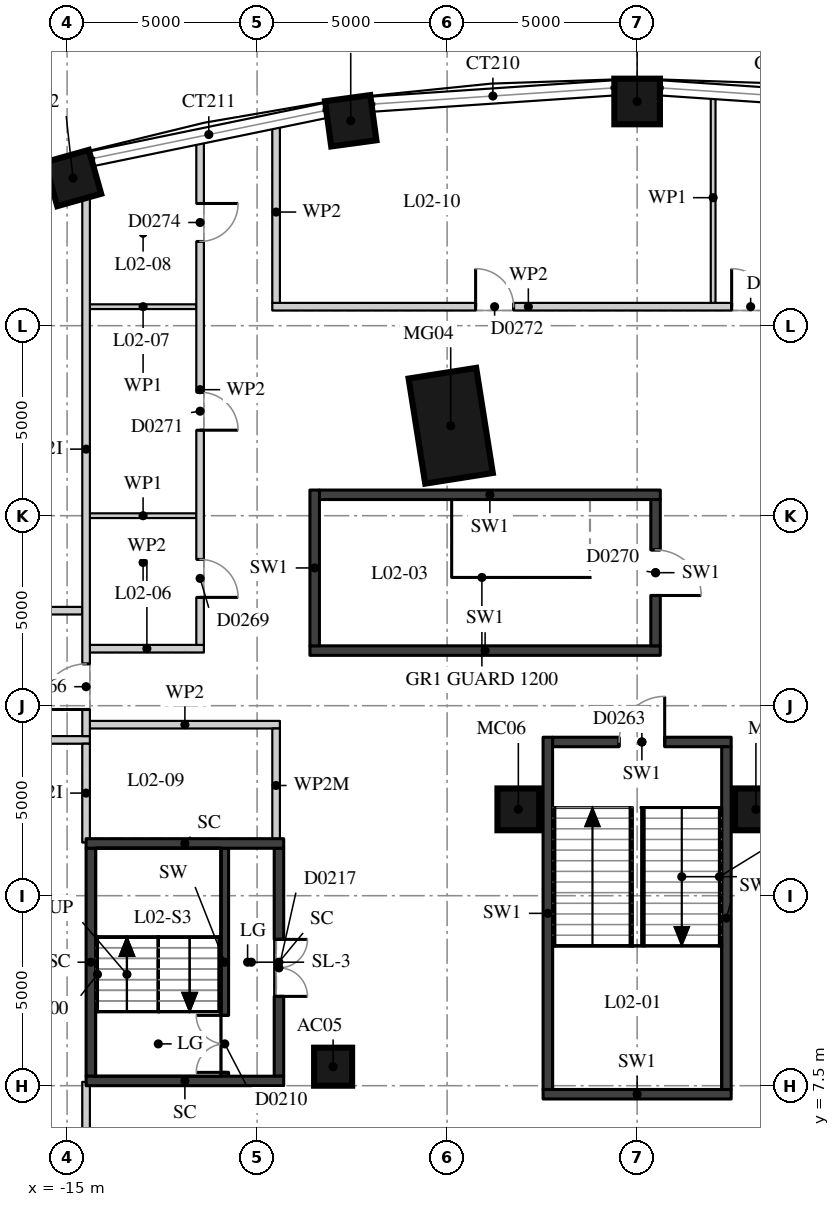
"""IFC4 building model, lengths in metres.
Left out: names, types, materials, properties, quantities, classifications, styles, units other than length and angle.
Written with IfcOpenShell. Run it as: python <this file> out.ifc"""

import sys

from ifc_helpers import new_model, si_unit, direction, frame, frame_2d, origin, origin_2d, place, context, subcontext, project, spatial, rectangle, extrude, element, fill, save


model = new_model("IFC4")
c1 = context("Model", 3, precision=1e-05, world=origin(), true_north=direction((0.0, 1.0)))
c2 = subcontext(c1, "Body", "Model", "MODEL_VIEW")
j1 = project(units=[si_unit("LENGTHUNIT", "METRE"), si_unit("PLANEANGLEUNIT", "RADIAN")], contexts=[c1])
p1 = place(None, origin())
s1 = spatial("IfcSite", under=j1, at=p1, CompositionType="ELEMENT")
p2 = place(p1, origin())
s2 = spatial("IfcBuilding", under=s1, at=p2, CompositionType="ELEMENT")
p3 = place(p2, frame((0.0, 0.0, 12.5)))
s3 = spatial("IfcBuildingStorey", under=s2, at=p3, CompositionType="ELEMENT", Elevation=12.5)
p4 = place(p3, frame((-4.906, 24.866, 0.0), z_axis=(0.0, 0.0, 1.0), x_axis=(-0.15614709407, 0.987733812833, 0.0)))
e1 = element("IfcColumn", 1, at=p4, inside=s3, PredefinedType="COLUMN", context=c2, shape_type="SweptSolid", body=[
    extrude(rectangle(XDim=2.8, YDim=1.8, at=origin_2d()), origin(), (0.0, 0.0, 1.0), 5.0),
])
p5 = place(p3, frame((-8.0, 8.0, 0.0), z_axis=(0.0, 0.0, 1.0), x_axis=(1.0, 0.0, 0.0)))
e2 = element("IfcColumn", 2, at=p5, inside=s3, PredefinedType="COLUMN", context=c2, shape_type="SweptSolid", body=[
    extrude(rectangle(XDim=1.0, YDim=1.0, at=origin_2d()), origin(), (0.0, 0.0, 1.0), 5.0),
])
for number, where, z_axis, x_axis in (
    (3, (3.126, 14.772, 0.0), (0.0, 0.0, 1.0), (1.0, 0.0, 0.0)),
    (4, (-3.126, 14.772, 0.0), (0.0, 0.0, 1.0), (1.0, 0.0, 0.0)),
):
    element("IfcColumn", number, at=place(p3, frame(where, z_axis=z_axis, x_axis=x_axis)), inside=s3, PredefinedType="COLUMN", context=c2, shape_type="SweptSolid", body=[
        extrude(rectangle(XDim=1.1, YDim=1.1, at=origin_2d()), origin(), (0.0, 0.0, 1.0), 5.0),
    ])
for number, where, z_axis, x_axis in (
    (5, (0.0, 33.4, 0.0), (0.0, 0.0, 1.0), (0.0, 1.0, 0.0)),
    (6, (-7.536, 32.893, 0.0), (0.0, 0.0, 1.0), (-0.135, 0.991, 0.0)),
    (7, (-14.844, 31.386, 0.0), (0.0, 0.0, 1.0), (-0.271, 0.963, 0.0)),
):
    element("IfcColumn", number, at=place(p3, frame(where, z_axis=z_axis, x_axis=x_axis)), inside=s3, PredefinedType="COLUMN", context=c2, shape_type="SweptSolid", body=[
        extrude(rectangle(XDim=1.2, YDim=1.2, at=origin_2d()), origin(), (0.0, 0.0, 1.0), 5.0),
    ])
p6 = place(p3, frame((-10.85, 7.75, 0.0), z_axis=(0.0, 0.0, 1.0), x_axis=(0.0, 1.0, 0.0)))
e8 = element("IfcWall", 8, at=p6, inside=s3, PredefinedType="SHEAR", context=c2, shape_type="SweptSolid", body=[
    extrude(rectangle(XDim=6.0, YDim=0.2, at=frame_2d((3.0, 0.0))), origin(), (0.0, 0.0, 1.0), 4.65),
])
p7 = place(p6, frame((0.1, 0.0, 0.0)))
e9 = element("IfcOpeningElement", 9, at=p7, cuts=e8, PredefinedType="OPENING", context=c2, shape_type="SweptSolid", body=[
    extrude(rectangle(XDim=1.5, YDim=2.1, at=frame_2d((0.75, 1.05))), frame((0.0, 0.11, 0.0), z_axis=(0.0, -1.0, 0.0), x_axis=(1.0, 0.0, 0.0)), (0.0, 0.0, 1.0), 0.22),
])
p8 = place(p3, frame((-14.375, 7.75, -0.41), z_axis=(0.0, 0.0, 1.0), x_axis=(0.0, 1.0, 0.0)))
e10 = element("IfcWall", 10, at=p8, inside=s3, PredefinedType="SHEAR", context=c2, shape_type="SweptSolid", body=[
    extrude(rectangle(XDim=6.0, YDim=0.25, at=frame_2d((3.0, 0.0))), origin(), (0.0, 0.0, 1.0), 5.06),
])
p9 = place(p3, frame((-9.425, 7.75, -0.41), z_axis=(0.0, 0.0, 1.0), x_axis=(0.0, 1.0, 0.0)))
e11 = element("IfcWall", 11, at=p9, inside=s3, PredefinedType="SHEAR", context=c2, shape_type="SweptSolid", body=[
    extrude(rectangle(XDim=6.0, YDim=0.25, at=frame_2d((3.0, 0.0))), origin(), (0.0, 0.0, 1.0), 5.06),
])
p10 = place(p9, frame((2.1, 0.0, 0.41)))
e12 = element("IfcOpeningElement", 12, at=p10, cuts=e11, PredefinedType="OPENING", context=c2, shape_type="SweptSolid", body=[
    extrude(rectangle(XDim=1.5, YDim=2.1, at=frame_2d((0.75, 1.05))), frame((0.0, 0.135, 0.0), z_axis=(0.0, -1.0, 0.0), x_axis=(1.0, 0.0, 0.0)), (0.0, 0.0, 1.0), 0.27),
])
for number, where, z_axis, x_axis in (
    (13, (-14.5, 13.875, -0.41), (0.0, 0.0, 1.0), (1.0, 0.0, 0.0)),
    (14, (-14.5, 7.625, -0.41), (0.0, 0.0, 1.0), (1.0, 0.0, 0.0)),
):
    element("IfcWall", number, at=place(p3, frame(where, z_axis=z_axis, x_axis=x_axis)), inside=s3, PredefinedType="SHEAR", context=c2, shape_type="SweptSolid", body=[
        extrude(rectangle(XDim=5.2, YDim=0.25, at=frame_2d((2.6, 0.0))), origin(), (0.0, 0.0, 1.0), 5.06),
    ])
p11 = place(p3, frame((-2.475, 7.275, 0.0), z_axis=(0.0, 0.0, 1.0), x_axis=(1.0, 0.0, 0.0)))
e15 = element("IfcWall", 15, at=p11, inside=s3, PredefinedType="SOLIDWALL", context=c2, shape_type="SweptSolid", body=[
    extrude(rectangle(XDim=4.95, YDim=0.25, at=frame_2d((2.475, 0.0))), origin(), (0.0, 0.0, 1.0), 4.65),
])
p12 = place(p3, frame((-2.225, 16.545, 0.0), z_axis=(0.0, 0.0, 1.0), x_axis=(1.0, 0.0, 0.0)))
e16 = element("IfcWall", 16, at=p12, inside=s3, PredefinedType="SOLIDWALL", context=c2, shape_type="SweptSolid", body=[
    extrude(rectangle(XDim=4.7, YDim=0.25, at=frame_2d((2.35, 0.0))), origin(), (0.0, 0.0, 1.0), 4.65),
])
p13 = place(p12, frame((1.75, 0.0, 0.0)))
e17 = element("IfcOpeningElement", 17, at=p13, cuts=e16, PredefinedType="OPENING", context=c2, shape_type="SweptSolid", body=[
    extrude(rectangle(XDim=1.2, YDim=2.1, at=frame_2d((0.6, 1.05))), frame((0.0, 0.135, 0.0), z_axis=(0.0, -1.0, 0.0), x_axis=(1.0, 0.0, 0.0)), (0.0, 0.0, 1.0), 0.27),
])
p14 = place(p3, frame((-38.084, 16.6, 0.0), z_axis=(0.0, 0.0, 1.0), x_axis=(1.0, 0.0, 0.0)))
e18 = element("IfcWall", 18, at=p14, inside=s3, PredefinedType="PARTITIONING", context=c2, shape_type="SweptSolid", body=[
    extrude(rectangle(XDim=23.685, YDim=0.2, at=frame_2d((11.842, 0.0))), origin(), (0.0, 0.0, 1.0), 4.65),
])
p15 = place(p14, frame((4.492, 0.0, 0.0)))
e19 = element("IfcOpeningElement", 19, at=p15, cuts=e18, PredefinedType="OPENING", context=c2, shape_type="SweptSolid", body=[
    extrude(rectangle(XDim=1.0, YDim=2.1, at=frame_2d((0.5, 1.05))), frame((0.0, 0.11, 0.0), z_axis=(0.0, -1.0, 0.0), x_axis=(1.0, 0.0, 0.0)), (0.0, 0.0, 1.0), 0.22),
])
p16 = place(p14, frame((15.584, 0.0, 0.0)))
e20 = element("IfcOpeningElement", 20, at=p16, cuts=e18, PredefinedType="OPENING", context=c2, shape_type="SweptSolid", body=[
    extrude(rectangle(XDim=1.0, YDim=2.1, at=frame_2d((0.5, 1.05))), frame((0.0, 0.11, 0.0), z_axis=(0.0, -1.0, 0.0), x_axis=(1.0, 0.0, 0.0)), (0.0, 0.0, 1.0), 0.22),
])
p17 = place(p3, frame((-14.4, 17.0, 0.0), z_axis=(0.0, 0.0, 1.0), x_axis=(1.0, 0.0, 0.0)))
e21 = element("IfcWall", 21, at=p17, inside=s3, PredefinedType="PARTITIONING", context=c2, shape_type="SweptSolid", body=[
    extrude(rectangle(XDim=5.0, YDim=0.2, at=frame_2d((2.5, 0.0))), origin(), (0.0, 0.0, 1.0), 4.65),
])
p18 = place(p3, frame((-8.61, 18.95, 0.0), z_axis=(0.0, 0.0, 1.0), x_axis=(1.0, 0.0, 0.0)))
e22 = element("IfcWall", 22, at=p18, inside=s3, PredefinedType="SOLIDWALL", context=c2, shape_type="SweptSolid", body=[
    extrude(rectangle(XDim=9.22, YDim=0.25, at=frame_2d((4.61, 0.0))), origin(), (0.0, 0.0, 1.0), 4.65),
])
p19 = place(p3, frame((-14.4, 19.0, 0.0), z_axis=(0.0, 0.0, 1.0), x_axis=(1.0, 0.0, 0.0)))
e23 = element("IfcWall", 23, at=p19, inside=s3, PredefinedType="PARTITIONING", context=c2, shape_type="SweptSolid", body=[
    extrude(rectangle(XDim=3.0, YDim=0.2, at=frame_2d((1.5, 0.0))), origin(), (0.0, 0.0, 1.0), 4.65),
])
p20 = place(p3, frame((-17.605, 20.0, 0.0), z_axis=(0.0, 0.0, 1.0), x_axis=(1.0, 0.0, 0.0)))
e24 = element("IfcWall", 24, at=p20, inside=s3, PredefinedType="PARTITIONING", context=c2, shape_type="SweptSolid", body=[
    extrude(rectangle(XDim=3.005, YDim=0.2, at=frame_2d((1.502, 0.0))), origin(), (0.0, 0.0, 1.0), 4.65),
])
p21 = place(p3, frame((-14.4, 22.5, 0.0), z_axis=(0.0, 0.0, 1.0), x_axis=(1.0, 0.0, 0.0)))
e25 = element("IfcWall", 25, at=p21, inside=s3, PredefinedType="PARTITIONING", context=c2, shape_type="SweptSolid", body=[
    extrude(rectangle(XDim=2.8, YDim=0.125, at=frame_2d((1.4, 0.0))), origin(), (0.0, 0.0, 1.0), 4.65),
])
p22 = place(p3, frame((-8.36, 23.05, 0.0), z_axis=(0.0, 0.0, 1.0), x_axis=(1.0, 0.0, 0.0)))
e26 = element("IfcWall", 26, at=p22, inside=s3, PredefinedType="SOLIDWALL", context=c2, shape_type="SweptSolid", body=[
    extrude(rectangle(XDim=8.97, YDim=0.25, at=frame_2d((4.485, 0.0))), origin(), (0.0, 0.0, 1.0), 4.65),
])
p23 = place(p3, frame((-14.4, 28.0, 0.0), z_axis=(0.0, 0.0, 1.0), x_axis=(1.0, 0.0, 0.0)))
e27 = element("IfcWall", 27, at=p23, inside=s3, PredefinedType="PARTITIONING", context=c2, shape_type="SweptSolid", body=[
    extrude(rectangle(XDim=2.8, YDim=0.125, at=frame_2d((1.4, 0.0))), origin(), (0.0, 0.0, 1.0), 4.65),
])
p24 = place(p3, frame((-9.6, 28.0, 0.0), z_axis=(0.0, 0.0, 1.0), x_axis=(1.0, 0.0, 0.0)))
e28 = element("IfcWall", 28, at=p24, inside=s3, PredefinedType="PARTITIONING", context=c2, shape_type="SweptSolid", body=[
    extrude(rectangle(XDim=13.475, YDim=0.2, at=frame_2d((6.738, 0.0))), origin(), (0.0, 0.0, 1.0), 4.65),
])
p25 = place(p24, frame((5.35, 0.0, 0.0)))
e29 = element("IfcOpeningElement", 29, at=p25, cuts=e28, PredefinedType="OPENING", context=c2, shape_type="SweptSolid", body=[
    extrude(rectangle(XDim=1.0, YDim=2.1, at=frame_2d((0.5, 1.05))), frame((0.0, 0.11, 0.0), z_axis=(0.0, -1.0, 0.0), x_axis=(1.0, 0.0, 0.0)), (0.0, 0.0, 1.0), 0.22),
])
p26 = place(p24, frame((12.087, 0.0, 0.0)))
e30 = element("IfcOpeningElement", 30, at=p26, cuts=e28, PredefinedType="OPENING", context=c2, shape_type="SweptSolid", body=[
    extrude(rectangle(XDim=1.0, YDim=2.1, at=frame_2d((0.5, 1.05))), frame((0.0, 0.11, 0.0), z_axis=(0.0, -1.0, 0.0), x_axis=(1.0, 0.0, 0.0)), (0.0, 0.0, 1.0), 0.22),
])
p27 = place(p3, frame((-14.5, -7.6, 0.0), z_axis=(0.0, 0.0, 1.0), x_axis=(0.0, 1.0, 0.0)))
e31 = element("IfcWall", 31, at=p27, inside=s3, PredefinedType="PARTITIONING", context=c2, shape_type="SweptSolid", body=[
    extrude(rectangle(XDim=15.2, YDim=0.2, at=frame_2d((7.6, 0.0))), origin(), (0.0, 0.0, 1.0), 4.65),
])
p28 = place(p27, frame((2.087, 0.0, 0.0)))
e32 = element("IfcOpeningElement", 32, at=p28, cuts=e31, PredefinedType="OPENING", context=c2, shape_type="SweptSolid", body=[
    extrude(rectangle(XDim=1.8, YDim=2.4, at=frame_2d((0.9, 1.2))), frame((0.0, 0.11, 0.0), z_axis=(0.0, -1.0, 0.0), x_axis=(1.0, 0.0, 0.0)), (0.0, 0.0, 1.0), 0.22),
])
p29 = place(p27, frame((11.312, 0.0, 0.0)))
e33 = element("IfcOpeningElement", 33, at=p29, cuts=e31, PredefinedType="OPENING", context=c2, shape_type="SweptSolid", body=[
    extrude(rectangle(XDim=1.8, YDim=2.4, at=frame_2d((0.9, 1.2))), frame((0.0, 0.11, 0.0), z_axis=(0.0, -1.0, 0.0), x_axis=(1.0, 0.0, 0.0)), (0.0, 0.0, 1.0), 0.22),
])
p30 = place(p3, frame((-14.5, 13.9, 0.0), z_axis=(0.0, 0.0, 1.0), x_axis=(0.0, 1.0, 0.0)))
e34 = element("IfcWall", 34, at=p30, inside=s3, PredefinedType="PARTITIONING", context=c2, shape_type="SweptSolid", body=[
    extrude(rectangle(XDim=2.6, YDim=0.2, at=frame_2d((1.3, 0.0))), origin(), (0.0, 0.0, 1.0), 4.2),
])
p31 = place(p3, frame((-14.5, 16.7, 0.0), z_axis=(0.0, 0.0, 1.0), x_axis=(0.0, 1.0, 0.0)))
e35 = element("IfcWall", 35, at=p31, inside=s3, PredefinedType="PARTITIONING", context=c2, shape_type="SweptSolid", body=[
    extrude(rectangle(XDim=15.103, YDim=0.2, at=frame_2d((7.552, 0.0))), origin(), (0.0, 0.0, 1.0), 4.2),
])
p32 = place(p31, frame((0.7, 0.0, 0.0)))
e36 = element("IfcOpeningElement", 36, at=p32, cuts=e35, PredefinedType="OPENING", context=c2, shape_type="SweptSolid", body=[
    extrude(rectangle(XDim=1.2, YDim=2.1, at=frame_2d((0.6, 1.05))), frame((0.0, 0.11, 0.0), z_axis=(0.0, -1.0, 0.0), x_axis=(1.0, 0.0, 0.0)), (0.0, 0.0, 1.0), 0.22),
])
p33 = place(p3, frame((-11.5, 19.1, 0.0), z_axis=(0.0, 0.0, 1.0), x_axis=(0.0, 1.0, 0.0)))
e37 = element("IfcWall", 37, at=p33, inside=s3, PredefinedType="PARTITIONING", context=c2, shape_type="SweptSolid", body=[
    extrude(rectangle(XDim=13.432, YDim=0.2, at=frame_2d((6.716, 0.0))), origin(), (0.0, 0.0, 1.0), 4.65),
])
p34 = place(p33, frame((1.25, 0.0, 0.0)))
e38 = element("IfcOpeningElement", 38, at=p34, cuts=e37, PredefinedType="OPENING", context=c2, shape_type="SweptSolid", body=[
    extrude(rectangle(XDim=1.0, YDim=2.1, at=frame_2d((0.5, 1.05))), frame((0.0, 0.11, 0.0), z_axis=(0.0, -1.0, 0.0), x_axis=(1.0, 0.0, 0.0)), (0.0, 0.0, 1.0), 0.22),
])
p35 = place(p33, frame((5.65, 0.0, 0.0)))
e39 = element("IfcOpeningElement", 39, at=p35, cuts=e37, PredefinedType="OPENING", context=c2, shape_type="SweptSolid", body=[
    extrude(rectangle(XDim=1.0, YDim=2.1, at=frame_2d((0.5, 1.05))), frame((0.0, 0.11, 0.0), z_axis=(0.0, -1.0, 0.0), x_axis=(1.0, 0.0, 0.0)), (0.0, 0.0, 1.0), 0.22),
])
p36 = place(p33, frame((10.616, 0.0, 0.0)))
e40 = element("IfcOpeningElement", 40, at=p36, cuts=e37, PredefinedType="OPENING", context=c2, shape_type="SweptSolid", body=[
    extrude(rectangle(XDim=1.0, YDim=2.1, at=frame_2d((0.5, 1.05))), frame((0.0, 0.11, 0.0), z_axis=(0.0, -1.0, 0.0), x_axis=(1.0, 0.0, 0.0)), (0.0, 0.0, 1.0), 0.22),
])
p37 = place(p3, frame((-9.5, 13.9, 0.0), z_axis=(0.0, 0.0, 1.0), x_axis=(0.0, 1.0, 0.0)))
e41 = element("IfcWall", 41, at=p37, inside=s3, PredefinedType="PARTITIONING", context=c2, shape_type="SweptSolid", body=[
    extrude(rectangle(XDim=3.0, YDim=0.2, at=frame_2d((1.5, 0.0))), origin(), (0.0, 0.0, 1.0), 4.1),
])
p38 = place(p3, frame((-9.5, 28.1, 0.0), z_axis=(0.0, 0.0, 1.0), x_axis=(0.0, 1.0, 0.0)))
e42 = element("IfcWall", 42, at=p38, inside=s3, PredefinedType="PARTITIONING", context=c2, shape_type="SweptSolid", body=[
    extrude(rectangle(XDim=4.781, YDim=0.2, at=frame_2d((2.39, 0.0))), origin(), (0.0, 0.0, 1.0), 4.65),
])
p39 = place(p3, frame((-8.485, 19.075, 0.0), z_axis=(0.0, 0.0, 1.0), x_axis=(0.0, 1.0, 0.0)))
e43 = element("IfcWall", 43, at=p39, inside=s3, PredefinedType="SOLIDWALL", context=c2, shape_type="SweptSolid", body=[
    extrude(rectangle(XDim=4.1, YDim=0.25, at=frame_2d((2.05, 0.0))), origin(), (0.0, 0.0, 1.0), 4.65),
])
p40 = place(p3, frame((-2.35, 7.4, 0.0), z_axis=(0.0, 0.0, 1.0), x_axis=(0.0, 1.0, 0.0)))
e44 = element("IfcWall", 44, at=p40, inside=s3, PredefinedType="SOLIDWALL", context=c2, shape_type="SweptSolid", body=[
    extrude(rectangle(XDim=9.27, YDim=0.25, at=frame_2d((4.635, 0.0))), origin(), (0.0, 0.0, 1.0), 4.65),
])
p41 = place(p3, frame((0.485, 19.075, 0.0), z_axis=(0.0, 0.0, 1.0), x_axis=(0.0, 1.0, 0.0)))
e45 = element("IfcWall", 45, at=p41, inside=s3, PredefinedType="SOLIDWALL", context=c2, shape_type="SweptSolid", body=[
    extrude(rectangle(XDim=3.85, YDim=0.25, at=frame_2d((1.925, 0.0))), origin(), (0.0, 0.0, 1.0), 4.65),
])
p42 = place(p41, frame((1.325, 0.0, 0.0)))
e46 = element("IfcOpeningElement", 46, at=p42, cuts=e45, PredefinedType="OPENING", context=c2, shape_type="SweptSolid", body=[
    extrude(rectangle(XDim=1.2, YDim=2.1, at=frame_2d((0.6, 1.05))), frame((0.0, 0.135, 0.0), z_axis=(0.0, -1.0, 0.0), x_axis=(1.0, 0.0, 0.0)), (0.0, 0.0, 1.0), 0.27),
])
p43 = place(p3, frame((2.0, 28.1, 0.0), z_axis=(0.0, 0.0, 1.0), x_axis=(0.0, 1.0, 0.0)))
e47 = element("IfcWall", 47, at=p43, inside=s3, PredefinedType="PARTITIONING", context=c2, shape_type="SweptSolid", body=[
    extrude(rectangle(XDim=5.537, YDim=0.125, at=frame_2d((2.769, 0.0))), origin(), (0.0, 0.0, 1.0), 4.65),
])
p44 = place(p3, frame((2.35, 7.4, 0.0), z_axis=(0.0, 0.0, 1.0), x_axis=(0.0, 1.0, 0.0)))
e48 = element("IfcWall", 48, at=p44, inside=s3, PredefinedType="SOLIDWALL", context=c2, shape_type="SweptSolid", body=[
    extrude(rectangle(XDim=9.02, YDim=0.25, at=frame_2d((4.51, 0.0))), origin(), (0.0, 0.0, 1.0), 4.65),
])
p45 = place(p7, origin())
e49 = element("IfcDoor", 49, at=p45, inside=s3, OperationType="DOUBLE_DOOR_SINGLE_SWING", PredefinedType="DOOR", context=c2, shape_type="SweptSolid", body=[
    extrude(rectangle(XDim=1.5, YDim=2.1, at=frame_2d((0.75, 1.05))), frame((0.0, 0.025, 0.0), z_axis=(0.0, -1.0, 0.0), x_axis=(1.0, 0.0, 0.0)), (0.0, 0.0, 1.0), 0.05),
])
fill(e9, e49)
p46 = place(p10, origin())
e50 = element("IfcDoor", 50, at=p46, inside=s3, OperationType="DOUBLE_DOOR_SINGLE_SWING", PredefinedType="DOOR", context=c2, shape_type="SweptSolid", body=[
    extrude(rectangle(XDim=1.5, YDim=2.1, at=frame_2d((0.75, 1.05))), frame((0.0, 0.025, 0.0), z_axis=(0.0, -1.0, 0.0), x_axis=(1.0, 0.0, 0.0)), (0.0, 0.0, 1.0), 0.05),
])
fill(e12, e50)
p47 = place(p32, origin())
e51 = element("IfcDoor", 51, at=p47, inside=s3, OperationType="SINGLE_SWING_LEFT", PredefinedType="DOOR", context=c2, shape_type="SweptSolid", body=[
    extrude(rectangle(XDim=1.2, YDim=2.1, at=frame_2d((0.6, 1.05))), frame((0.0, 0.025, 0.0), z_axis=(0.0, -1.0, 0.0), x_axis=(1.0, 0.0, 0.0)), (0.0, 0.0, 1.0), 0.05),
])
fill(e36, e51)
p48 = place(p34, origin())
e52 = element("IfcDoor", 52, at=p48, inside=s3, OperationType="SINGLE_SWING_RIGHT", PredefinedType="DOOR", context=c2, shape_type="SweptSolid", body=[
    extrude(rectangle(XDim=1.0, YDim=2.1, at=frame_2d((0.5, 1.05))), frame((0.0, 0.025, 0.0), z_axis=(0.0, -1.0, 0.0), x_axis=(1.0, 0.0, 0.0)), (0.0, 0.0, 1.0), 0.05),
])
fill(e38, e52)
p49 = place(p35, origin())
e53 = element("IfcDoor", 53, at=p49, inside=s3, OperationType="SINGLE_SWING_RIGHT", PredefinedType="DOOR", context=c2, shape_type="SweptSolid", body=[
    extrude(rectangle(XDim=1.0, YDim=2.1, at=frame_2d((0.5, 1.05))), frame((0.0, 0.025, 0.0), z_axis=(0.0, -1.0, 0.0), x_axis=(1.0, 0.0, 0.0)), (0.0, 0.0, 1.0), 0.05),
])
fill(e39, e53)
p50 = place(p36, origin())
e54 = element("IfcDoor", 54, at=p50, inside=s3, OperationType="SINGLE_SWING_LEFT", PredefinedType="DOOR", context=c2, shape_type="SweptSolid", body=[
    extrude(rectangle(XDim=1.0, YDim=2.1, at=frame_2d((0.5, 1.05))), frame((0.0, 0.025, 0.0), z_axis=(0.0, -1.0, 0.0), x_axis=(1.0, 0.0, 0.0)), (0.0, 0.0, 1.0), 0.05),
])
fill(e40, e54)
p51 = place(p25, origin())
e55 = element("IfcDoor", 55, at=p51, inside=s3, OperationType="SINGLE_SWING_LEFT", PredefinedType="DOOR", context=c2, shape_type="SweptSolid", body=[
    extrude(rectangle(XDim=1.0, YDim=2.1, at=frame_2d((0.5, 1.05))), frame((0.0, 0.025, 0.0), z_axis=(0.0, -1.0, 0.0), x_axis=(1.0, 0.0, 0.0)), (0.0, 0.0, 1.0), 0.05),
])
fill(e29, e55)
p52 = place(p26, origin())
e56 = element("IfcDoor", 56, at=p52, inside=s3, OperationType="SINGLE_SWING_LEFT", PredefinedType="DOOR", context=c2, shape_type="SweptSolid", body=[
    extrude(rectangle(XDim=1.0, YDim=2.1, at=frame_2d((0.5, 1.05))), frame((0.0, 0.025, 0.0), z_axis=(0.0, -1.0, 0.0), x_axis=(1.0, 0.0, 0.0)), (0.0, 0.0, 1.0), 0.05),
])
fill(e30, e56)
p53 = place(p13, origin())
e57 = element("IfcDoor", 57, at=p53, inside=s3, OperationType="SINGLE_SWING_RIGHT", PredefinedType="DOOR", context=c2, shape_type="SweptSolid", body=[
    extrude(rectangle(XDim=1.2, YDim=2.1, at=frame_2d((0.6, 1.05))), frame((0.0, 0.025, 0.0), z_axis=(0.0, -1.0, 0.0), x_axis=(1.0, 0.0, 0.0)), (0.0, 0.0, 1.0), 0.05),
])
fill(e17, e57)
p54 = place(p42, origin())
e58 = element("IfcDoor", 58, at=p54, inside=s3, OperationType="SINGLE_SWING_RIGHT", PredefinedType="DOOR", context=c2, shape_type="SweptSolid", body=[
    extrude(rectangle(XDim=1.2, YDim=2.1, at=frame_2d((0.6, 1.05))), frame((0.0, 0.025, 0.0), z_axis=(0.0, -1.0, 0.0), x_axis=(1.0, 0.0, 0.0)), (0.0, 0.0, 1.0), 0.05),
])
fill(e46, e58)
save(model, sys.argv[1])
